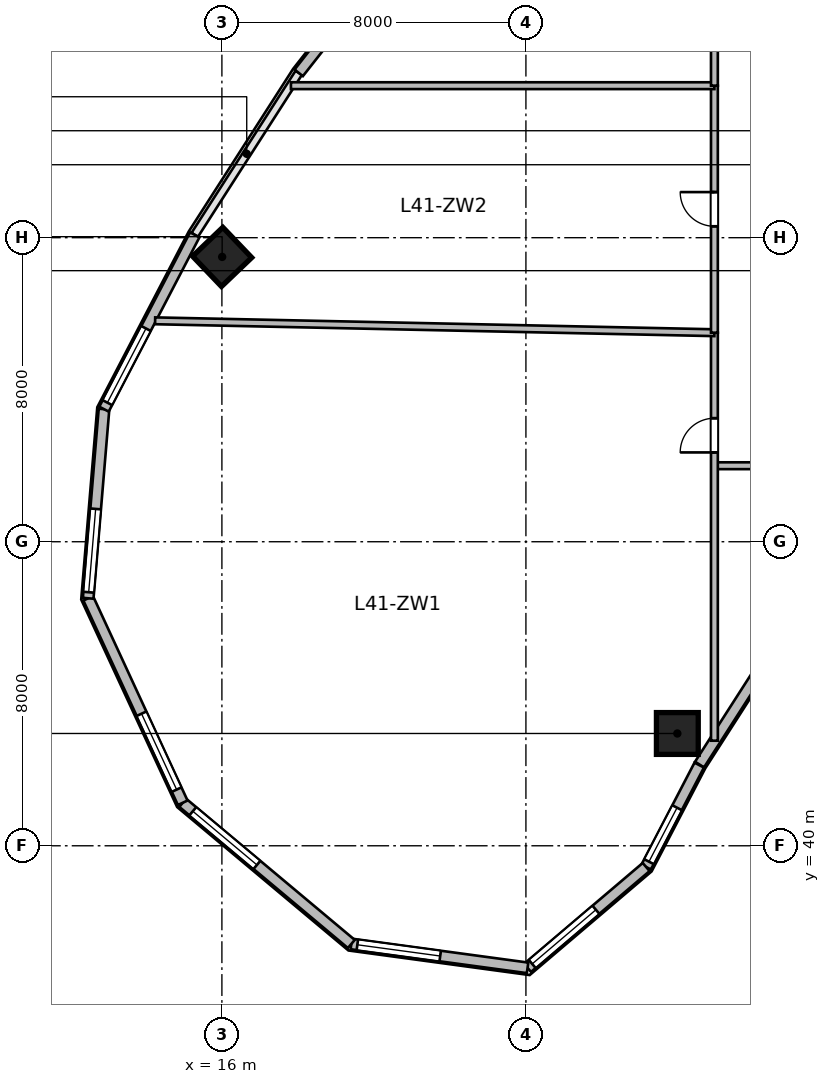
"""IFC4 building model, lengths in metres.
Left out: names, types, materials, properties, quantities, classifications, styles, units other than length and angle.
Written with IfcOpenShell. Run it as: python <this file> out.ifc"""

import sys

from ifc_helpers import new_model, si_unit, direction, frame, frame_2d, origin, origin_2d, place, context, subcontext, project, spatial, rectangle, circle, extrude, source, transform, mapped, element, fill, save


model = new_model("IFC4")
c1 = context("Model", 3, precision=1e-05, world=origin(), true_north=direction((0.0, 1.0)))
c2 = subcontext(c1, "Body", "Model", "MODEL_VIEW")
j1 = project(units=[si_unit("LENGTHUNIT", "METRE"), si_unit("PLANEANGLEUNIT", "RADIAN")], contexts=[c1])
p1 = place(None, origin())
s1 = spatial("IfcSite", under=j1, at=p1, CompositionType="ELEMENT")
p2 = place(p1, origin())
s2 = spatial("IfcBuilding", under=s1, at=p2, CompositionType="ELEMENT")
p3 = place(p2, frame((0.0, 0.0, 170.1)))
s3 = spatial("IfcBuildingStorey", under=s2, at=p3, CompositionType="ELEMENT", Elevation=170.1)
m1 = source(origin(), c2, "Body", "SweptSolid", [
    extrude(circle(Radius=0.55, at=origin_2d()), origin(), (0.0, 0.0, 1.0), 3.9),
])
p4 = place(p3, frame((27.985, 42.955, 0.0), z_axis=(0.0, 0.0, 1.0), x_axis=(-0.690756218984, 0.723087716626, 0.0)))
e1 = element("IfcColumn", 1, at=p4, inside=s3, PredefinedType="COLUMN", context=c2, shape_type="MappedRepresentation", body=[
    mapped(m1, transform((0.0, 0.0, 0.0), scale=1.0)),
])
m2 = source(origin(), c2, "Body", "SweptSolid", [
    extrude(rectangle(XDim=1.1, YDim=1.1, at=origin_2d()), origin(), (0.0, 0.0, 1.0), 3.9),
])
p5 = place(p3, frame((16.007, 55.494, 0.0), z_axis=(0.0, 0.0, 1.0), x_axis=(-0.690756218984, 0.723087716626, 0.0)))
e2 = element("IfcColumn", 2, at=p5, inside=s3, PredefinedType="COLUMN", context=c2, shape_type="MappedRepresentation", body=[
    mapped(m2, transform((0.0, 0.0, 0.0), scale=1.0)),
])
m3 = source(origin(), c2, "Body", "SweptSolid", [
    extrude(rectangle(XDim=2.981, YDim=0.28, at=frame_2d((1.49, 0.0))), origin(), (0.0, 0.0, 1.0), 3.65),
])
p6 = place(p3, frame((30.179, 44.645, 0.0), z_axis=(0.0, 0.0, 1.0), x_axis=(-0.540194451908, -0.841540227278, 0.0)))
e3 = element("IfcWall", 3, at=p6, inside=s3, PredefinedType="SOLIDWALL", context=c2, shape_type="MappedRepresentation", body=[
    mapped(m3, transform((0.0, 0.0, 0.0), scale=1.0)),
])
m4 = source(origin(), c2, "Body", "SweptSolid", [
    extrude(rectangle(XDim=3.024, YDim=0.28, at=frame_2d((1.512, 0.0))), origin(), (0.0, 0.0, 1.0), 3.65),
])
p7 = place(p3, frame((28.561, 42.123, 0.0), z_axis=(0.0, 0.0, 1.0), x_axis=(-0.461718746531, -0.887026380161, 0.0)))
e4 = element("IfcWall", 4, at=p7, inside=s3, PredefinedType="SOLIDWALL", context=c2, shape_type="MappedRepresentation", body=[
    mapped(m4, transform((0.0, 0.0, 0.0), scale=1.0)),
])
p8 = place(p7, frame((1.264, 0.0, 0.95)))
e5 = element("IfcOpeningElement", 5, at=p8, cuts=e4, PredefinedType="OPENING", context=c2, shape_type="SweptSolid", body=[
    extrude(rectangle(XDim=1.6, YDim=1.9, at=frame_2d((0.8, 0.95))), frame((0.0, 0.15, 0.0), z_axis=(0.0, -1.0, 0.0), x_axis=(1.0, 0.0, 0.0)), (0.0, 0.0, 1.0), 0.3),
])
m5 = source(origin(), c2, "Body", "SweptSolid", [
    extrude(rectangle(XDim=4.096, YDim=0.28, at=frame_2d((2.048, 0.0))), origin(), (0.0, 0.0, 1.0), 3.65),
])
p9 = place(p3, frame((27.164, 39.44, 0.0), z_axis=(0.0, 0.0, 1.0), x_axis=(-0.761926081737, -0.647663991564, 0.0)))
e6 = element("IfcWall", 6, at=p9, inside=s3, PredefinedType="SOLIDWALL", context=c2, shape_type="MappedRepresentation", body=[
    mapped(m5, transform((0.0, 0.0, 0.0), scale=1.0)),
])
p10 = place(p9, frame((1.736, 0.0, 0.95)))
e7 = element("IfcOpeningElement", 7, at=p10, cuts=e6, PredefinedType="OPENING", context=c2, shape_type="SweptSolid", body=[
    extrude(rectangle(XDim=2.2, YDim=2.1, at=frame_2d((1.1, 1.05))), frame((0.0, 0.15, 0.0), z_axis=(0.0, -1.0, 0.0), x_axis=(1.0, 0.0, 0.0)), (0.0, 0.0, 1.0), 0.3),
])
m6 = source(origin(), c2, "Body", "SweptSolid", [
    extrude(rectangle(XDim=4.68, YDim=0.28, at=frame_2d((2.34, 0.0))), origin(), (0.0, 0.0, 1.0), 3.65),
])
p11 = place(p3, frame((24.043, 36.788, 0.0), z_axis=(0.0, 0.0, 1.0), x_axis=(-0.990931146435, 0.134370618162, 0.0)))
e8 = element("IfcWall", 8, at=p11, inside=s3, PredefinedType="SOLIDWALL", context=c2, shape_type="MappedRepresentation", body=[
    mapped(m6, transform((0.0, 0.0, 0.0), scale=1.0)),
])
p12 = place(p11, frame((2.32, 0.0, 0.95)))
e9 = element("IfcOpeningElement", 9, at=p12, cuts=e8, PredefinedType="OPENING", context=c2, shape_type="SweptSolid", body=[
    extrude(rectangle(XDim=2.2, YDim=2.1, at=frame_2d((1.1, 1.05))), frame((0.0, 0.15, 0.0), z_axis=(0.0, -1.0, 0.0), x_axis=(1.0, 0.0, 0.0)), (0.0, 0.0, 1.0), 0.3),
])
m7 = source(origin(), c2, "Body", "SweptSolid", [
    extrude(rectangle(XDim=5.786, YDim=0.28, at=frame_2d((2.893, 0.0))), origin(), (0.0, 0.0, 1.0), 3.65),
])
p13 = place(p3, frame((19.406, 37.417, 0.0), z_axis=(0.0, 0.0, 1.0), x_axis=(-0.766711306852, 0.641992034176, 0.0)))
e10 = element("IfcWall", 10, at=p13, inside=s3, PredefinedType="SOLIDWALL", context=c2, shape_type="MappedRepresentation", body=[
    mapped(m7, transform((0.0, 0.0, 0.0), scale=1.0)),
])
p14 = place(p13, frame((3.24, 0.0, 0.95)))
e11 = element("IfcOpeningElement", 11, at=p14, cuts=e10, PredefinedType="OPENING", context=c2, shape_type="SweptSolid", body=[
    extrude(rectangle(XDim=2.2, YDim=2.1, at=frame_2d((1.1, 1.05))), frame((0.0, 0.15, 0.0), z_axis=(0.0, -1.0, 0.0), x_axis=(1.0, 0.0, 0.0)), (0.0, 0.0, 1.0), 0.3),
])
m8 = source(origin(), c2, "Body", "SweptSolid", [
    extrude(rectangle(XDim=5.927, YDim=0.28, at=frame_2d((2.964, 0.0))), origin(), (0.0, 0.0, 1.0), 3.65),
])
p15 = place(p3, frame((14.969, 41.131, 0.0), z_axis=(0.0, 0.0, 1.0), x_axis=(-0.419656204795, 0.907683132914, 0.0)))
e12 = element("IfcWall", 12, at=p15, inside=s3, PredefinedType="SOLIDWALL", context=c2, shape_type="MappedRepresentation", body=[
    mapped(m8, transform((0.0, 0.0, 0.0), scale=1.0)),
])
p16 = place(p15, frame((0.382, 0.0, 0.95)))
e13 = element("IfcOpeningElement", 13, at=p16, cuts=e12, PredefinedType="OPENING", context=c2, shape_type="SweptSolid", body=[
    extrude(rectangle(XDim=2.2, YDim=2.1, at=frame_2d((1.1, 1.05))), frame((0.0, 0.15, 0.0), z_axis=(0.0, -1.0, 0.0), x_axis=(1.0, 0.0, 0.0)), (0.0, 0.0, 1.0), 0.3),
])
m9 = source(origin(), c2, "Body", "SweptSolid", [
    extrude(rectangle(XDim=4.994, YDim=0.28, at=frame_2d((2.497, 0.0))), origin(), (0.0, 0.0, 1.0), 3.65),
])
p17 = place(p3, frame((12.481, 46.512, 0.0), z_axis=(0.0, 0.0, 1.0), x_axis=(0.083344839916, 0.996520766296, 0.0)))
e14 = element("IfcWall", 14, at=p17, inside=s3, PredefinedType="SOLIDWALL", context=c2, shape_type="MappedRepresentation", body=[
    mapped(m9, transform((0.0, 0.0, 0.0), scale=1.0)),
])
p18 = place(p17, frame((0.16, 0.0, 0.95)))
e15 = element("IfcOpeningElement", 15, at=p18, cuts=e14, PredefinedType="OPENING", context=c2, shape_type="SweptSolid", body=[
    extrude(rectangle(XDim=2.2, YDim=2.1, at=frame_2d((1.1, 1.05))), frame((0.0, 0.15, 0.0), z_axis=(0.0, -1.0, 0.0), x_axis=(1.0, 0.0, 0.0)), (0.0, 0.0, 1.0), 0.3),
])
m10 = source(origin(), c2, "Body", "SweptSolid", [
    extrude(rectangle(XDim=5.171, YDim=0.28, at=frame_2d((2.585, 0.0))), origin(), (0.0, 0.0, 1.0), 3.65),
])
p19 = place(p3, frame((12.898, 51.489, 0.0), z_axis=(0.0, 0.0, 1.0), x_axis=(0.461752581363, 0.887008767491, 0.0)))
e16 = element("IfcWall", 16, at=p19, inside=s3, PredefinedType="SOLIDWALL", context=c2, shape_type="MappedRepresentation", body=[
    mapped(m10, transform((0.0, 0.0, 0.0), scale=1.0)),
])
p20 = place(p19, frame((0.193, 0.0, 0.95)))
e17 = element("IfcOpeningElement", 17, at=p20, cuts=e16, PredefinedType="OPENING", context=c2, shape_type="SweptSolid", body=[
    extrude(rectangle(XDim=2.2, YDim=2.1, at=frame_2d((1.1, 1.05))), frame((0.0, 0.15, 0.0), z_axis=(0.0, -1.0, 0.0), x_axis=(1.0, 0.0, 0.0)), (0.0, 0.0, 1.0), 0.3),
])
m11 = source(origin(), c2, "Body", "SweptSolid", [
    extrude(rectangle(XDim=4.922, YDim=0.28, at=frame_2d((2.461, 0.0))), origin(), (0.0, 0.0, 1.0), 3.65),
])
p21 = place(p3, frame((18.021, 60.338, 0.0), z_axis=(0.0, 0.0, 1.0), x_axis=(0.61817639101, 0.786039407153, 0.0)))
e18 = element("IfcWall", 18, at=p21, inside=s3, PredefinedType="SOLIDWALL", context=c2, shape_type="MappedRepresentation", body=[
    mapped(m11, transform((0.0, 0.0, 0.0), scale=1.0)),
])
m12 = source(origin(), c2, "Body", "SweptSolid", [
    extrude(rectangle(XDim=2.5, YDim=0.18, at=frame_2d((1.25, 0.0))), origin(), (0.0, 0.0, 1.0), 3.65),
])
p22 = place(p3, frame((29.0, 50.0, 0.0), z_axis=(0.0, 0.0, 1.0), x_axis=(1.0, 0.0, 0.0)))
e19 = element("IfcWall", 19, at=p22, inside=s3, PredefinedType="PLUMBINGWALL", context=c2, shape_type="MappedRepresentation", body=[
    mapped(m12, transform((0.0, 0.0, 0.0), scale=1.0)),
])
m13 = source(origin(), c2, "Body", "SweptSolid", [
    extrude(rectangle(XDim=10.735, YDim=0.18, at=frame_2d((5.368, 0.0))), origin(), (0.0, 0.0, 1.0), 2.942),
])
p23 = place(p3, frame((28.96, 42.765, 0.0), z_axis=(0.0, 0.0, 1.0), x_axis=(0.0, 1.0, 0.0)))
e20 = element("IfcWall", 20, at=p23, inside=s3, PredefinedType="PLUMBINGWALL", context=c2, shape_type="MappedRepresentation", body=[
    mapped(m13, transform((0.0, 0.0, 0.0), scale=1.0)),
])
p24 = place(p23, frame((7.585, 0.0, 0.0)))
e21 = element("IfcOpeningElement", 21, at=p24, cuts=e20, PredefinedType="OPENING", context=c2, shape_type="SweptSolid", body=[
    extrude(rectangle(XDim=0.9, YDim=2.08, at=frame_2d((0.45, 1.04))), frame((0.0, 0.1, 0.0), z_axis=(0.0, -1.0, 0.0), x_axis=(1.0, 0.0, 0.0)), (0.0, 0.0, 1.0), 0.2),
])
m14 = source(origin(), c2, "Body", "SweptSolid", [
    extrude(rectangle(XDim=14.72, YDim=0.18, at=frame_2d((7.36, 0.0))), origin(), (0.0, 0.0, 1.0), 3.65),
])
p25 = place(p3, frame((14.243, 53.813, 0.0), z_axis=(0.0, 0.0, 1.0), x_axis=(0.999773932637, -0.021262258118, 0.0)))
e22 = element("IfcWall", 22, at=p25, inside=s3, PredefinedType="PLUMBINGWALL", context=c2, shape_type="MappedRepresentation", body=[
    mapped(m14, transform((0.0, 0.0, 0.0), scale=1.0)),
])
m15 = source(origin(), c2, "Body", "SweptSolid", [
    extrude(rectangle(XDim=6.5, YDim=0.18, at=frame_2d((3.25, 0.0))), origin(), (0.0, 0.0, 1.0), 3.081),
])
p26 = place(p3, frame((28.96, 53.5, 0.0), z_axis=(0.0, 0.0, 1.0), x_axis=(0.0, 1.0, 0.0)))
e23 = element("IfcWall", 23, at=p26, inside=s3, PredefinedType="PLUMBINGWALL", context=c2, shape_type="MappedRepresentation", body=[
    mapped(m15, transform((0.0, 0.0, 0.0), scale=1.0)),
])
p27 = place(p26, frame((2.8, 0.0, 0.0)))
e24 = element("IfcOpeningElement", 24, at=p27, cuts=e23, PredefinedType="OPENING", context=c2, shape_type="SweptSolid", body=[
    extrude(rectangle(XDim=0.9, YDim=2.08, at=frame_2d((0.45, 1.04))), frame((0.0, 0.1, 0.0), z_axis=(0.0, -1.0, 0.0), x_axis=(1.0, 0.0, 0.0)), (0.0, 0.0, 1.0), 0.2),
])
m16 = source(origin(), c2, "Body", "SweptSolid", [
    extrude(rectangle(XDim=11.144, YDim=0.18, at=frame_2d((5.572, 0.0))), origin(), (0.0, 0.0, 1.0), 3.65),
])
p28 = place(p3, frame((17.816, 60.0, 0.0), z_axis=(0.0, 0.0, 1.0), x_axis=(1.0, 0.0, 0.0)))
e25 = element("IfcWall", 25, at=p28, inside=s3, PredefinedType="PLUMBINGWALL", context=c2, shape_type="MappedRepresentation", body=[
    mapped(m16, transform((0.0, 0.0, 0.0), scale=1.0)),
])
m17 = source(origin(), c2, "Body", "SweptSolid", [
    extrude(rectangle(XDim=5.5, YDim=0.18, at=frame_2d((2.75, 0.0))), origin(), (0.0, 0.0, 1.0), 2.942),
])
p29 = place(p3, frame((28.96, 60.0, 0.0), z_axis=(0.0, 0.0, 1.0), x_axis=(0.0, 1.0, 0.0)))
e26 = element("IfcWall", 26, at=p29, inside=s3, PredefinedType="PLUMBINGWALL", context=c2, shape_type="MappedRepresentation", body=[
    mapped(m17, transform((0.0, 0.0, 0.0), scale=1.0)),
])
p30 = place(p29, frame((2.3, 0.0, 0.0)))
e27 = element("IfcOpeningElement", 27, at=p30, cuts=e26, PredefinedType="OPENING", context=c2, shape_type="SweptSolid", body=[
    extrude(rectangle(XDim=0.9, YDim=2.08, at=frame_2d((0.45, 1.04))), frame((0.0, 0.1, 0.0), z_axis=(0.0, -1.0, 0.0), x_axis=(1.0, 0.0, 0.0)), (0.0, 0.0, 1.0), 0.2),
])
m18 = source(origin(), c2, "Body", "SweptSolid", [
    extrude(rectangle(XDim=1.6, YDim=1.9, at=frame_2d((0.8, 0.95))), frame((0.0, 0.03, 0.0), z_axis=(0.0, -1.0, 0.0), x_axis=(1.0, 0.0, 0.0)), (0.0, 0.0, 1.0), 0.06),
])
p31 = place(p8, origin())
e28 = element("IfcWindow", 28, at=p31, inside=s3, PartitioningType="SINGLE_PANEL", PredefinedType="WINDOW", context=c2, shape_type="MappedRepresentation", body=[
    mapped(m18, transform((0.0, 0.0, 0.0), scale=1.0)),
])
fill(e5, e28)
m19 = source(origin(), c2, "Body", "SweptSolid", [
    extrude(rectangle(XDim=2.2, YDim=2.1, at=frame_2d((1.1, 1.05))), frame((0.0, 0.03, 0.0), z_axis=(0.0, -1.0, 0.0), x_axis=(1.0, 0.0, 0.0)), (0.0, 0.0, 1.0), 0.06),
])
p32 = place(p10, origin())
e29 = element("IfcWindow", 29, at=p32, inside=s3, PartitioningType="TRIPLE_PANEL_VERTICAL", PredefinedType="WINDOW", context=c2, shape_type="MappedRepresentation", body=[
    mapped(m19, transform((0.0, 0.0, 0.0), scale=1.0)),
])
fill(e7, e29)
p33 = place(p12, origin())
e30 = element("IfcWindow", 30, at=p33, inside=s3, PartitioningType="TRIPLE_PANEL_VERTICAL", PredefinedType="WINDOW", context=c2, shape_type="MappedRepresentation", body=[
    mapped(m19, transform((0.0, 0.0, 0.0), scale=1.0)),
])
fill(e9, e30)
p34 = place(p14, origin())
e31 = element("IfcWindow", 31, at=p34, inside=s3, PartitioningType="TRIPLE_PANEL_VERTICAL", PredefinedType="WINDOW", context=c2, shape_type="MappedRepresentation", body=[
    mapped(m19, transform((0.0, 0.0, 0.0), scale=1.0)),
])
fill(e11, e31)
p35 = place(p16, origin())
e32 = element("IfcWindow", 32, at=p35, inside=s3, PartitioningType="TRIPLE_PANEL_VERTICAL", PredefinedType="WINDOW", context=c2, shape_type="MappedRepresentation", body=[
    mapped(m19, transform((0.0, 0.0, 0.0), scale=1.0)),
])
fill(e13, e32)
p36 = place(p18, origin())
e33 = element("IfcWindow", 33, at=p36, inside=s3, PartitioningType="TRIPLE_PANEL_VERTICAL", PredefinedType="WINDOW", context=c2, shape_type="MappedRepresentation", body=[
    mapped(m19, transform((0.0, 0.0, 0.0), scale=1.0)),
])
fill(e15, e33)
p37 = place(p20, origin())
e34 = element("IfcWindow", 34, at=p37, inside=s3, PartitioningType="TRIPLE_PANEL_VERTICAL", PredefinedType="WINDOW", context=c2, shape_type="MappedRepresentation", body=[
    mapped(m19, transform((0.0, 0.0, 0.0), scale=1.0)),
])
fill(e17, e34)
m20 = source(origin(), c2, "Body", "SweptSolid", [
    extrude(rectangle(XDim=0.9, YDim=2.08, at=frame_2d((0.45, 1.04))), frame((0.0, 0.025, 0.0), z_axis=(0.0, -1.0, 0.0), x_axis=(1.0, 0.0, 0.0)), (0.0, 0.0, 1.0), 0.05),
])
p38 = place(p24, origin())
e35 = element("IfcDoor", 35, at=p38, inside=s3, OperationType="SINGLE_SWING_LEFT", PredefinedType="DOOR", context=c2, shape_type="MappedRepresentation", body=[
    mapped(m20, transform((0.0, 0.0, 0.0), scale=1.0)),
])
fill(e21, e35)
p39 = place(p27, origin())
e36 = element("IfcDoor", 36, at=p39, inside=s3, OperationType="SINGLE_SWING_RIGHT", PredefinedType="DOOR", context=c2, shape_type="MappedRepresentation", body=[
    mapped(m20, transform((0.0, 0.0, 0.0), scale=1.0)),
])
fill(e24, e36)
save(model, sys.argv[1])
